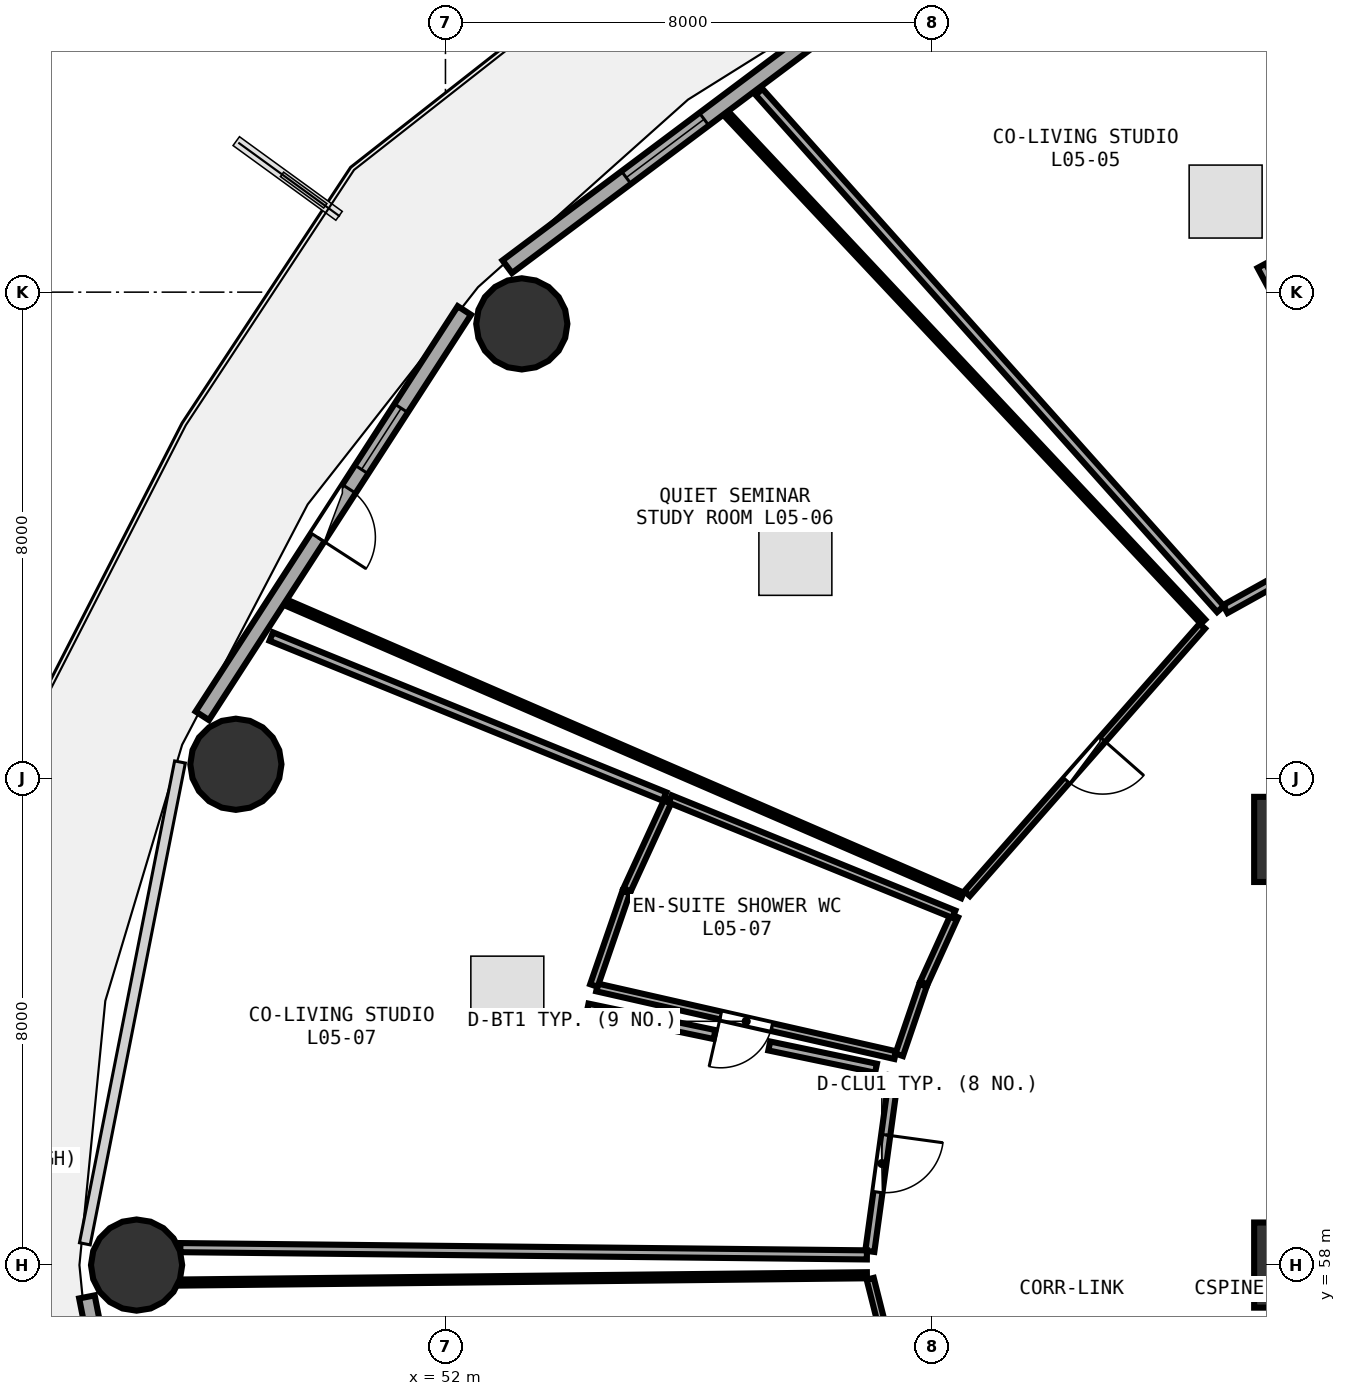
"""IFC4 building model, lengths in metres.
Left out: names, types, materials, properties, quantities, classifications, styles, units other than length and angle.
Written with IfcOpenShell. Run it as: python <this file> out.ifc"""

import sys

from ifc_helpers import new_model, si_unit, direction, frame, frame_2d, origin, origin_2d, place, context, subcontext, project, spatial, rectangle, circle, extrude, element, fill, save


model = new_model("IFC4")
c1 = context("Model", 3, precision=1e-05, world=origin(), true_north=direction((0.0, 1.0)))
c2 = subcontext(c1, "Body", "Model", "MODEL_VIEW")
j1 = project(units=[si_unit("LENGTHUNIT", "METRE"), si_unit("PLANEANGLEUNIT", "RADIAN")], contexts=[c1])
p1 = place(None, origin())
s1 = spatial("IfcSite", under=j1, at=p1, CompositionType="ELEMENT")
p2 = place(p1, origin())
s2 = spatial("IfcBuilding", under=s1, at=p2, CompositionType="ELEMENT")
p3 = place(p2, frame((0.0, 0.0, 22.5)))
s3 = spatial("IfcBuildingStorey", under=s2, at=p3, CompositionType="ELEMENT", Elevation=22.5)
for number, where, z_axis, x_axis in (
    (1, (66.0, 65.0, 0.0), (0.0, 0.0, 1.0), (1.0, 0.0, 0.0)),
    (2, (66.0, 58.0, 0.0), (0.0, 0.0, 1.0), (1.0, 0.0, 0.0)),
):
    element("IfcColumn", number, at=place(p3, frame(where, z_axis=z_axis, x_axis=x_axis)), inside=s3, PredefinedType="PILASTER", context=c2, shape_type="SweptSolid", body=[
        extrude(rectangle(XDim=1.4, YDim=1.4, at=origin_2d()), origin(), (0.0, 0.0, 1.0), 3.75),
    ])
for number, where, z_axis, x_axis in (
    (3, (53.256, 73.478, 0.0), (0.0, 0.0, 1.0), (1.0, 0.0, 0.0)),
    (4, (48.553, 66.236, 0.0), (0.0, 0.0, 1.0), (1.0, 0.0, 0.0)),
    (5, (46.92, 58.0, 0.0), (0.0, 0.0, 1.0), (1.0, 0.0, 0.0)),
):
    element("IfcColumn", number, at=place(p3, frame(where, z_axis=z_axis, x_axis=x_axis)), inside=s3, PredefinedType="COLUMN", context=c2, shape_type="SweptSolid", body=[
        extrude(circle(Radius=0.75, at=origin_2d()), origin(), (0.0, 0.0, 1.0), 3.75),
    ])
p4 = place(p3, frame((59.651, 79.389, 0.0), z_axis=(0.0, 0.0, 1.0), x_axis=(-0.80030733173, -0.599590005569, 0.0)))
e6 = element("IfcWall", 6, at=p4, inside=s3, PredefinedType="SOLIDWALL", context=c2, shape_type="SweptSolid", body=[
    extrude(rectangle(XDim=8.291, YDim=0.26, at=frame_2d((4.145, 0.0))), origin(), (0.0, 0.0, 1.0), 3.475),
])
p5 = place(p4, frame((4.245, 0.0, 0.85)))
e7 = element("IfcOpeningElement", 7, at=p5, cuts=e6, PredefinedType="OPENING", context=c2, shape_type="SweptSolid", body=[
    extrude(rectangle(XDim=1.6, YDim=1.45, at=frame_2d((0.8, 0.725))), frame((0.0, 0.14, 0.0), z_axis=(0.0, -1.0, 0.0), x_axis=(1.0, 0.0, 0.0)), (0.0, 0.0, 1.0), 0.28),
])
p6 = place(p3, frame((52.311, 73.698, 0.0), z_axis=(0.0, 0.0, 1.0), x_axis=(-0.543005114258, -0.839729388488, 0.0)))
e8 = element("IfcWall", 8, at=p6, inside=s3, PredefinedType="SOLIDWALL", context=c2, shape_type="SweptSolid", body=[
    extrude(rectangle(XDim=7.938, YDim=0.26, at=frame_2d((3.969, 0.0))), origin(), (0.0, 0.0, 1.0), 3.475),
])
p7 = place(p6, frame((3.494, 0.0, 0.0)))
e9 = element("IfcOpeningElement", 9, at=p7, cuts=e8, PredefinedType="OPENING", context=c2, shape_type="SweptSolid", body=[
    extrude(rectangle(XDim=0.95, YDim=2.1, at=frame_2d((0.475, 1.05))), frame((0.0, 0.14, 0.0), z_axis=(0.0, -1.0, 0.0), x_axis=(1.0, 0.0, 0.0)), (0.0, 0.0, 1.0), 0.28),
])
p8 = place(p6, frame((1.914, 0.0, 0.85)))
e10 = element("IfcOpeningElement", 10, at=p8, cuts=e8, PredefinedType="OPENING", context=c2, shape_type="SweptSolid", body=[
    extrude(rectangle(XDim=1.2, YDim=1.45, at=frame_2d((0.6, 0.725))), frame((0.0, 0.14, 0.0), z_axis=(0.0, -1.0, 0.0), x_axis=(1.0, 0.0, 0.0)), (0.0, 0.0, 1.0), 0.28),
])
p9 = place(p3, frame((46.104, 57.477, 0.0), z_axis=(0.0, 0.0, 1.0), x_axis=(0.193726159581, -0.98105564322, 0.0)))
e11 = element("IfcWall", 11, at=p9, inside=s3, PredefinedType="SOLIDWALL", context=c2, shape_type="SweptSolid", body=[
    extrude(rectangle(XDim=7.703, YDim=0.26, at=frame_2d((3.851, 0.0))), origin(), (0.0, 0.0, 1.0), 3.475),
])
p10 = place(p9, frame((3.051, 0.0, 0.85)))
e12 = element("IfcOpeningElement", 12, at=p10, cuts=e11, PredefinedType="OPENING", context=c2, shape_type="SweptSolid", body=[
    extrude(rectangle(XDim=1.6, YDim=1.45, at=frame_2d((0.8, 0.725))), frame((0.0, 0.14, 0.0), z_axis=(0.0, -1.0, 0.0), x_axis=(1.0, 0.0, 0.0)), (0.0, 0.0, 1.0), 0.28),
])
p11 = place(p3, frame((67.571, 70.313, 0.0), z_axis=(0.0, 0.0, 1.0), x_axis=(-0.874179278891, -0.48560332408, 0.0)))
e13 = element("IfcWall", 13, at=p11, inside=s3, PredefinedType="PARTITIONING", context=c2, shape_type="SweptSolid", body=[
    extrude(rectangle(XDim=3.14, YDim=0.15, at=frame_2d((1.57, 0.0))), origin(), (0.0, 0.0, 1.0), 3.48),
])
p12 = place(p11, frame((1.095, 0.0, 0.0)))
e14 = element("IfcOpeningElement", 14, at=p12, cuts=e13, PredefinedType="OPENING", context=c2, shape_type="SweptSolid", body=[
    extrude(rectangle(XDim=0.95, YDim=2.08, at=frame_2d((0.475, 1.04))), frame((0.0, 0.085, 0.0), z_axis=(0.0, -1.0, 0.0), x_axis=(1.0, 0.0, 0.0)), (0.0, 0.0, 1.0), 0.17),
])
p13 = place(p3, frame((64.446, 68.507, 0.0), z_axis=(0.0, 0.0, 1.0), x_axis=(-0.660323401664, -0.75098136143, 0.0)))
e15 = element("IfcWall", 15, at=p13, inside=s3, PredefinedType="PARTITIONING", context=c2, shape_type="SweptSolid", body=[
    extrude(rectangle(XDim=5.857, YDim=0.12, at=frame_2d((2.929, 0.0))), origin(), (0.0, 0.0, 1.0), 2.875),
])
p14 = place(p13, frame((2.479, 0.0, 0.0)))
e16 = element("IfcOpeningElement", 16, at=p14, cuts=e15, PredefinedType="OPENING", context=c2, shape_type="SweptSolid", body=[
    extrude(rectangle(XDim=0.9, YDim=2.08, at=frame_2d((0.45, 1.04))), frame((0.0, 0.07, 0.0), z_axis=(0.0, -1.0, 0.0), x_axis=(1.0, 0.0, 0.0)), (0.0, 0.0, 1.0), 0.14),
])
p15 = place(p3, frame((59.397, 61.452, 0.0), z_axis=(0.0, 0.0, 1.0), x_axis=(-0.975187669184, 0.221379786503, 0.0)))
e17 = element("IfcWall", 17, at=p15, inside=s3, PredefinedType="PLUMBINGWALL", context=c2, shape_type="SweptSolid", body=[
    extrude(rectangle(XDim=5.029, YDim=0.13, at=frame_2d((2.514, 0.0))), origin(), (0.0, 0.0, 1.0), 3.175),
])
p16 = place(p15, frame((2.084, 0.0, 0.0)))
e18 = element("IfcOpeningElement", 18, at=p16, cuts=e17, PredefinedType="OPENING", context=c2, shape_type="SweptSolid", body=[
    extrude(rectangle(XDim=0.86, YDim=2.05, at=frame_2d((0.43, 1.025))), frame((0.0, 0.075, 0.0), z_axis=(0.0, -1.0, 0.0), x_axis=(1.0, 0.0, 0.0)), (0.0, 0.0, 1.0), 0.15),
])
p17 = place(p3, frame((59.375, 61.115, 0.0), z_axis=(0.0, 0.0, 1.0), x_axis=(-0.135838186105, -0.990731036758, 0.0)))
e19 = element("IfcWall", 19, at=p17, inside=s3, PredefinedType="PARTITIONING", context=c2, shape_type="SweptSolid", body=[
    extrude(rectangle(XDim=2.915, YDim=0.15, at=frame_2d((1.458, 0.0))), origin(), (0.0, 0.0, 1.0), 3.48),
])
p18 = place(p17, frame((0.983, 0.0, 0.0)))
e20 = element("IfcOpeningElement", 20, at=p18, cuts=e19, PredefinedType="OPENING", context=c2, shape_type="SweptSolid", body=[
    extrude(rectangle(XDim=0.95, YDim=2.08, at=frame_2d((0.475, 1.04))), frame((0.0, 0.085, 0.0), z_axis=(0.0, -1.0, 0.0), x_axis=(1.0, 0.0, 0.0)), (0.0, 0.0, 1.0), 0.17),
])
p19 = place(p3, frame((58.986, 57.775, 0.0), z_axis=(0.0, 0.0, 1.0), x_axis=(0.244192294026, -0.969726829338, 0.0)))
e21 = element("IfcWall", 21, at=p19, inside=s3, PredefinedType="PARTITIONING", context=c2, shape_type="SweptSolid", body=[
    extrude(rectangle(XDim=5.651, YDim=0.12, at=frame_2d((2.825, 0.0))), origin(), (0.0, 0.0, 1.0), 3.48),
])
p20 = place(p19, frame((2.375, 0.0, 0.0)))
e22 = element("IfcOpeningElement", 22, at=p20, cuts=e21, PredefinedType="OPENING", context=c2, shape_type="SweptSolid", body=[
    extrude(rectangle(XDim=0.9, YDim=2.08, at=frame_2d((0.45, 1.04))), frame((0.0, 0.07, 0.0), z_axis=(0.0, -1.0, 0.0), x_axis=(1.0, 0.0, 0.0)), (0.0, 0.0, 1.0), 0.14),
])
p21 = place(p3, frame((64.746, 68.789, 0.0), z_axis=(0.0, 0.0, 1.0), x_axis=(-0.66580890104, 0.746122313897, 0.0)))
e23 = element("IfcWall", 23, at=p21, inside=s3, PredefinedType="PARTITIONING", context=c2, shape_type="SweptSolid", body=[
    extrude(rectangle(XDim=11.399, YDim=0.15, at=frame_2d((5.7, 0.0))), origin(), (0.0, 0.0, 1.0), 2.875),
])
p22 = place(p3, frame((65.423, 74.434, 0.0), z_axis=(0.0, 0.0, 1.0), x_axis=(0.473660949034, -0.880707275637, 0.0)))
e24 = element("IfcWall", 24, at=p22, inside=s3, PredefinedType="PARTITIONING", context=c2, shape_type="SweptSolid", body=[
    extrude(rectangle(XDim=1.891, YDim=0.15, at=frame_2d((0.946, 0.0))), origin(), (0.0, 0.0, 1.0), 3.175),
])
p23 = place(p3, frame((60.502, 64.079, 0.0), z_axis=(0.0, 0.0, 1.0), x_axis=(-0.917695041134, 0.397285554077, 0.0)))
e25 = element("IfcWall", 25, at=p23, inside=s3, PredefinedType="PARTITIONING", context=c2, shape_type="SweptSolid", body=[
    extrude(rectangle(XDim=12.07, YDim=0.1, at=frame_2d((6.035, 0.0))), origin(), (0.0, 0.0, 1.0), 2.875),
])
p24 = place(p3, frame((56.632, 76.922, 0.0), z_axis=(0.0, 0.0, 1.0), x_axis=(0.684261294523, -0.729236916796, 0.0)))
e26 = element("IfcWall", 26, at=p24, inside=s3, PredefinedType="PARTITIONING", context=c2, shape_type="SweptSolid", body=[
    extrude(rectangle(XDim=11.438, YDim=0.1, at=frame_2d((5.719, 0.0))), origin(), (0.0, 0.0, 1.0), 2.875),
])
p25 = place(p3, frame((60.372, 63.745, 0.0), z_axis=(0.0, 0.0, 1.0), x_axis=(-0.4138937247, -0.910325208183, 0.0)))
e27 = element("IfcWall", 27, at=p25, inside=s3, PredefinedType="PLUMBINGWALL", context=c2, shape_type="SweptSolid", body=[
    extrude(rectangle(XDim=1.216, YDim=0.13, at=frame_2d((0.608, 0.0))), origin(), (0.0, 0.0, 1.0), 3.48),
])
p26 = place(p3, frame((59.854, 62.601, 0.0), z_axis=(0.0, 0.0, 1.0), x_axis=(-0.323735286305, -0.946147696928, 0.0)))
e28 = element("IfcWall", 28, at=p26, inside=s3, PredefinedType="PLUMBINGWALL", context=c2, shape_type="SweptSolid", body=[
    extrude(rectangle(XDim=1.208, YDim=0.13, at=frame_2d((0.604, 0.0))), origin(), (0.0, 0.0, 1.0), 3.48),
])
p27 = place(p3, frame((54.441, 62.598, 0.0), z_axis=(0.0, 0.0, 1.0), x_axis=(0.326356647952, 0.945246707657, 0.0)))
e29 = element("IfcWall", 29, at=p27, inside=s3, PredefinedType="PLUMBINGWALL", context=c2, shape_type="SweptSolid", body=[
    extrude(rectangle(XDim=1.624, YDim=0.13, at=frame_2d((0.812, 0.0))), origin(), (0.0, 0.0, 1.0), 3.48),
])
p28 = place(p3, frame((54.986, 64.17, 0.0), z_axis=(0.0, 0.0, 1.0), x_axis=(0.41762687648, 0.908618617486, 0.0)))
e30 = element("IfcWall", 30, at=p28, inside=s3, PredefinedType="PLUMBINGWALL", context=c2, shape_type="SweptSolid", body=[
    extrude(rectangle(XDim=1.634, YDim=0.13, at=frame_2d((0.817, 0.0))), origin(), (0.0, 0.0, 1.0), 2.875),
])
p29 = place(p3, frame((55.696, 65.666, 0.0), z_axis=(0.0, 0.0, 1.0), x_axis=(0.926504606816, -0.376283421835, 0.0)))
e31 = element("IfcWall", 31, at=p29, inside=s3, PredefinedType="PLUMBINGWALL", context=c2, shape_type="SweptSolid", body=[
    extrude(rectangle(XDim=5.036, YDim=0.13, at=frame_2d((2.518, 0.0))), origin(), (0.0, 0.0, 1.0), 2.875),
])
p30 = place(p3, frame((58.931, 58.167, 0.0), z_axis=(0.0, 0.0, 1.0), x_axis=(-0.999943877154, 0.010594458135, 0.0)))
e32 = element("IfcWall", 32, at=p30, inside=s3, PredefinedType="PARTITIONING", context=c2, shape_type="SweptSolid", body=[
    extrude(rectangle(XDim=11.292, YDim=0.15, at=frame_2d((5.646, 0.0))), origin(), (0.0, 0.0, 1.0), 2.875),
])
p31 = place(p3, frame((49.135, 68.336, 0.0), z_axis=(0.0, 0.0, 1.0), x_axis=(0.926325178802, -0.376724917038, 0.0)))
e33 = element("IfcWall", 33, at=p31, inside=s3, PredefinedType="PARTITIONING", context=c2, shape_type="SweptSolid", body=[
    extrude(rectangle(XDim=6.983, YDim=0.15, at=frame_2d((3.492, 0.0))), origin(), (0.0, 0.0, 1.0), 2.875),
])
p32 = place(p3, frame((54.337, 62.227, 0.0), z_axis=(0.0, 0.0, 1.0), x_axis=(0.978922282622, -0.204233113343, 0.0)))
e34 = element("IfcWall", 34, at=p32, inside=s3, PredefinedType="PARTITIONING", context=c2, shape_type="SweptSolid", body=[
    extrude(rectangle(XDim=2.133, YDim=0.15, at=frame_2d((1.066, 0.0))), origin(), (0.0, 0.0, 1.0), 3.175),
])
p33 = place(p3, frame((57.325, 61.603, 0.0), z_axis=(0.0, 0.0, 1.0), x_axis=(0.978929424395, -0.204198878681, 0.0)))
e35 = element("IfcWall", 35, at=p33, inside=s3, PredefinedType="PARTITIONING", context=c2, shape_type="SweptSolid", body=[
    extrude(rectangle(XDim=1.793, YDim=0.15, at=frame_2d((0.897, 0.0))), origin(), (0.0, 0.0, 1.0), 3.235),
])
p34 = place(p3, frame((47.64, 57.713, 0.0), z_axis=(0.0, 0.0, 1.0), x_axis=(0.999943877154, 0.010594458135, 0.0)))
e36 = element("IfcWall", 36, at=p34, inside=s3, PredefinedType="PARTITIONING", context=c2, shape_type="SweptSolid", body=[
    extrude(rectangle(XDim=11.292, YDim=0.1, at=frame_2d((5.646, 0.0))), origin(), (0.0, 0.0, 1.0), 2.875),
])
p35 = place(p5, origin())
e37 = element("IfcWindow", 37, at=p35, inside=s3, PartitioningType="SINGLE_PANEL", PredefinedType="WINDOW", context=c2, shape_type="SweptSolid", body=[
    extrude(rectangle(XDim=1.6, YDim=1.45, at=frame_2d((0.8, 0.725))), frame((0.0, 0.03, 0.0), z_axis=(0.0, -1.0, 0.0), x_axis=(1.0, 0.0, 0.0)), (0.0, 0.0, 1.0), 0.06),
])
fill(e7, e37)
p36 = place(p7, frame((0.95, 0.0, 0.0), z_axis=(0.0, 0.0, 1.0), x_axis=(-1.0, 0.0, 0.0)))
e38 = element("IfcDoor", 38, at=p36, inside=s3, OperationType="SINGLE_SWING_LEFT", PredefinedType="DOOR", context=c2, shape_type="SweptSolid", body=[
    extrude(rectangle(XDim=0.95, YDim=2.1, at=frame_2d((0.475, 1.05))), frame((0.0, 0.025, 0.0), z_axis=(0.0, -1.0, 0.0), x_axis=(1.0, 0.0, 0.0)), (0.0, 0.0, 1.0), 0.05),
])
fill(e9, e38)
p37 = place(p8, origin())
e39 = element("IfcWindow", 39, at=p37, inside=s3, PartitioningType="SINGLE_PANEL", PredefinedType="WINDOW", context=c2, shape_type="SweptSolid", body=[
    extrude(rectangle(XDim=1.2, YDim=1.45, at=frame_2d((0.6, 0.725))), frame((0.0, 0.03, 0.0), z_axis=(0.0, -1.0, 0.0), x_axis=(1.0, 0.0, 0.0)), (0.0, 0.0, 1.0), 0.06),
])
fill(e10, e39)
p38 = place(p14, origin())
e40 = element("IfcDoor", 40, at=p38, inside=s3, OperationType="SINGLE_SWING_LEFT", PredefinedType="DOOR", context=c2, shape_type="SweptSolid", body=[
    extrude(rectangle(XDim=0.9, YDim=2.08, at=frame_2d((0.45, 1.04))), frame((0.0, 0.025, 0.0), z_axis=(0.0, -1.0, 0.0), x_axis=(1.0, 0.0, 0.0)), (0.0, 0.0, 1.0), 0.05),
])
fill(e16, e40)
p39 = place(p16, origin())
e41 = element("IfcDoor", 41, at=p39, inside=s3, OperationType="SINGLE_SWING_RIGHT", PredefinedType="DOOR", context=c2, shape_type="SweptSolid", body=[
    extrude(rectangle(XDim=0.86, YDim=2.05, at=frame_2d((0.43, 1.025))), frame((0.0, 0.025, 0.0), z_axis=(0.0, -1.0, 0.0), x_axis=(1.0, 0.0, 0.0)), (0.0, 0.0, 1.0), 0.05),
])
fill(e18, e41)
p40 = place(p18, origin())
e42 = element("IfcDoor", 42, at=p40, inside=s3, OperationType="SINGLE_SWING_LEFT", PredefinedType="DOOR", context=c2, shape_type="SweptSolid", body=[
    extrude(rectangle(XDim=0.95, YDim=2.08, at=frame_2d((0.475, 1.04))), frame((0.0, 0.025, 0.0), z_axis=(0.0, -1.0, 0.0), x_axis=(1.0, 0.0, 0.0)), (0.0, 0.0, 1.0), 0.05),
])
fill(e20, e42)
save(model, sys.argv[1])
